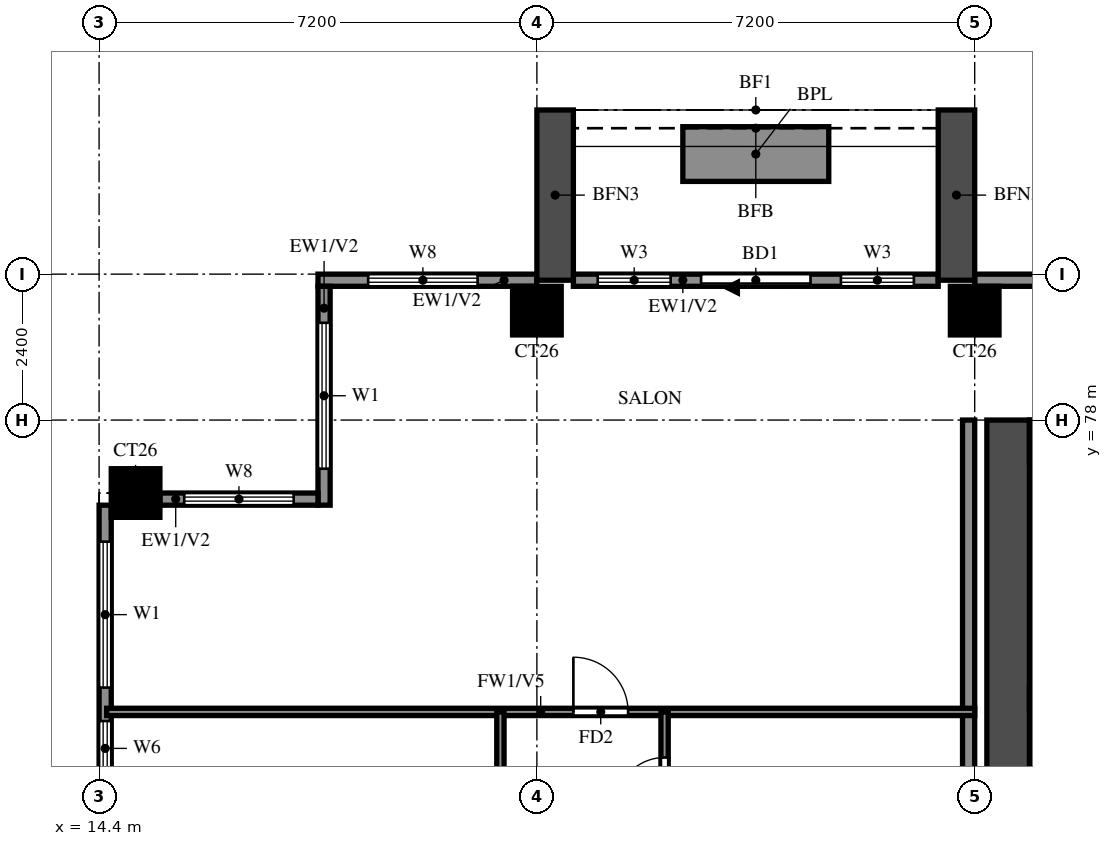
"""IFC4 building model, lengths in metres.
Left out: names, types, materials, properties, quantities, classifications, styles, units other than length and angle.
Written with IfcOpenShell. Run it as: python <this file> out.ifc"""

import sys

from ifc_helpers import new_model, si_unit, direction, frame, frame_2d, origin, origin_2d, place, context, subcontext, project, spatial, rectangle, extrude, source, transform, mapped, element, fill, save


model = new_model("IFC4")
c1 = context("Model", 3, precision=1e-05, world=origin(), true_north=direction((0.0, 1.0)))
c2 = subcontext(c1, "Body", "Model", "MODEL_VIEW")
j1 = project(units=[si_unit("LENGTHUNIT", "METRE"), si_unit("PLANEANGLEUNIT", "RADIAN")], contexts=[c1])
p1 = place(None, origin())
s1 = spatial("IfcSite", under=j1, at=p1, CompositionType="ELEMENT")
p2 = place(p1, origin())
s2 = spatial("IfcBuilding", under=s1, at=p2, CompositionType="ELEMENT")
p3 = place(p2, frame((0.0, 0.0, 178.0)))
s3 = spatial("IfcBuildingStorey", under=s2, at=p3, CompositionType="ELEMENT", Elevation=178.0)
m1 = source(origin(), c2, "Body", "SweptSolid", [
    extrude(rectangle(XDim=0.8, YDim=0.8, at=origin_2d()), origin(), (0.0, 0.0, 1.0), 3.2),
])
for number, where, z_axis, x_axis in (
    (1, (15.0, 76.8, 0.0), (0.0, 0.0, 1.0), (1.0, 0.0, 0.0)),
    (2, (21.6, 79.8, 0.0), (0.0, 0.0, 1.0), (1.0, 0.0, 0.0)),
    (3, (28.8, 79.8, 0.0), (0.0, 0.0, 1.0), (1.0, 0.0, 0.0)),
):
    element("IfcColumn", number, at=place(p3, frame(where, z_axis=z_axis, x_axis=x_axis)), inside=s3, PredefinedType="COLUMN", context=c2, shape_type="MappedRepresentation", body=[
        mapped(m1, transform((0.0, 0.0, 0.0))),
    ])
p4 = place(p3, frame((29.35, 66.1, 0.0), z_axis=(0.0, 0.0, 1.0), x_axis=(0.0, 1.0, 0.0)))
e4 = element("IfcWall", 4, at=p4, inside=s3, PredefinedType="SHEAR", context=c2, shape_type="SweptSolid", body=[
    extrude(rectangle(XDim=11.9, YDim=0.7, at=frame_2d((5.95, 0.0))), origin(), (0.0, 0.0, 1.0), 3.2),
])
p5 = place(p3, frame((29.7, 77.65, 0.0), z_axis=(0.0, 0.0, 1.0), x_axis=(1.0, 0.0, 0.0)))
e5 = element("IfcWall", 5, at=p5, inside=s3, PredefinedType="SHEAR", context=c2, shape_type="SweptSolid", body=[
    extrude(rectangle(XDim=41.4, YDim=0.7, at=frame_2d((20.7, 0.0))), origin(), (0.0, 0.0, 1.0), 3.2),
])
p6 = place(p3, frame((29.7, 73.425, 0.0), z_axis=(0.0, 0.0, 1.0), x_axis=(1.0, 0.0, 0.0)))
e6 = element("IfcWall", 6, at=p6, inside=s3, PredefinedType="SHEAR", context=c2, shape_type="SweptSolid", body=[
    extrude(rectangle(XDim=3.125, YDim=0.35, at=frame_2d((1.562, 0.0))), origin(), (0.0, 0.0, 1.0), 3.2),
])
p7 = place(p3, frame((82.6, 80.3, 0.0), z_axis=(0.0, 0.0, 1.0), x_axis=(-1.0, 0.0, 0.0)))
e7 = element("IfcWall", 7, at=p7, inside=s3, PredefinedType="SOLIDWALL", context=c2, shape_type="SweptSolid", body=[
    extrude(rectangle(XDim=53.8, YDim=0.2, at=frame_2d((26.9, 0.0))), origin(), (0.0, 0.0, 1.0), 3.2),
])
p8 = place(p7, frame((0.725, 0.0, 0.6)))
e8 = element("IfcOpeningElement", 8, at=p8, cuts=e7, PredefinedType="OPENING", context=c2, shape_type="SweptSolid", body=[
    extrude(rectangle(XDim=1.8, YDim=2.4, at=frame_2d((0.9, 1.2))), frame((0.0, 0.11, 0.0), z_axis=(0.0, -1.0, 0.0), x_axis=(1.0, 0.0, 0.0)), (0.0, 0.0, 1.0), 0.22),
])
p9 = place(p7, frame((4.35, 0.0, 0.6)))
e9 = element("IfcOpeningElement", 9, at=p9, cuts=e7, PredefinedType="OPENING", context=c2, shape_type="SweptSolid", body=[
    extrude(rectangle(XDim=2.4, YDim=2.4, at=frame_2d((1.2, 1.2))), frame((0.0, 0.11, 0.0), z_axis=(0.0, -1.0, 0.0), x_axis=(1.0, 0.0, 0.0)), (0.0, 0.0, 1.0), 0.22),
])
p10 = place(p7, frame((7.25, 0.0, 0.6)))
e10 = element("IfcOpeningElement", 10, at=p10, cuts=e7, PredefinedType="OPENING", context=c2, shape_type="SweptSolid", body=[
    extrude(rectangle(XDim=2.4, YDim=2.4, at=frame_2d((1.2, 1.2))), frame((0.0, 0.11, 0.0), z_axis=(0.0, -1.0, 0.0), x_axis=(1.0, 0.0, 0.0)), (0.0, 0.0, 1.0), 0.22),
])
p11 = place(p3, frame((28.2, 80.3, 0.0), z_axis=(0.0, 0.0, 1.0), x_axis=(-1.0, 0.0, 0.0)))
e11 = element("IfcWall", 11, at=p11, inside=s3, PredefinedType="SOLIDWALL", context=c2, shape_type="SweptSolid", body=[
    extrude(rectangle(XDim=6.0, YDim=0.2, at=frame_2d((3.0, 0.0))), origin(), (0.0, 0.0, 1.0), 3.2),
])
p12 = place(p11, frame((2.1, 0.0, 0.0)))
e12 = element("IfcOpeningElement", 12, at=p12, cuts=e11, PredefinedType="OPENING", context=c2, shape_type="SweptSolid", body=[
    extrude(rectangle(XDim=1.8, YDim=2.4, at=frame_2d((0.9, 1.2))), frame((0.0, 0.11, 0.0), z_axis=(0.0, -1.0, 0.0), x_axis=(1.0, 0.0, 0.0)), (0.0, 0.0, 1.0), 0.22),
])
p13 = place(p11, frame((0.4, 0.0, 0.6)))
e13 = element("IfcOpeningElement", 13, at=p13, cuts=e11, PredefinedType="OPENING", context=c2, shape_type="SweptSolid", body=[
    extrude(rectangle(XDim=1.2, YDim=2.4, at=frame_2d((0.6, 1.2))), frame((0.0, 0.11, 0.0), z_axis=(0.0, -1.0, 0.0), x_axis=(1.0, 0.0, 0.0)), (0.0, 0.0, 1.0), 0.22),
])
p14 = place(p11, frame((4.4, 0.0, 0.6)))
e14 = element("IfcOpeningElement", 14, at=p14, cuts=e11, PredefinedType="OPENING", context=c2, shape_type="SweptSolid", body=[
    extrude(rectangle(XDim=1.2, YDim=2.4, at=frame_2d((0.6, 1.2))), frame((0.0, 0.11, 0.0), z_axis=(0.0, -1.0, 0.0), x_axis=(1.0, 0.0, 0.0)), (0.0, 0.0, 1.0), 0.22),
])
p15 = place(p3, frame((21.6, 80.3, 0.0), z_axis=(0.0, 0.0, 1.0), x_axis=(-1.0, 0.0, 0.0)))
e15 = element("IfcWall", 15, at=p15, inside=s3, PredefinedType="SOLIDWALL", context=c2, shape_type="SweptSolid", body=[
    extrude(rectangle(XDim=3.6, YDim=0.2, at=frame_2d((1.8, 0.0))), origin(), (0.0, 0.0, 1.0), 3.2),
])
p16 = place(p15, frame((0.975, 0.0, 0.6)))
e16 = element("IfcOpeningElement", 16, at=p16, cuts=e15, PredefinedType="OPENING", context=c2, shape_type="SweptSolid", body=[
    extrude(rectangle(XDim=1.8, YDim=2.4, at=frame_2d((0.9, 1.2))), frame((0.0, 0.11, 0.0), z_axis=(0.0, -1.0, 0.0), x_axis=(1.0, 0.0, 0.0)), (0.0, 0.0, 1.0), 0.22),
])
p17 = place(p3, frame((18.1, 80.2, 0.0), z_axis=(0.0, 0.0, 1.0), x_axis=(0.0, -1.0, 0.0)))
e17 = element("IfcWall", 17, at=p17, inside=s3, PredefinedType="SOLIDWALL", context=c2, shape_type="SweptSolid", body=[
    extrude(rectangle(XDim=3.6, YDim=0.2, at=frame_2d((1.8, 0.0))), origin(), (0.0, 0.0, 1.0), 3.2),
])
p18 = place(p17, frame((0.6, 0.0, 0.6)))
e18 = element("IfcOpeningElement", 18, at=p18, cuts=e17, PredefinedType="OPENING", context=c2, shape_type="SweptSolid", body=[
    extrude(rectangle(XDim=2.4, YDim=2.4, at=frame_2d((1.2, 1.2))), frame((0.0, 0.11, 0.0), z_axis=(0.0, -1.0, 0.0), x_axis=(1.0, 0.0, 0.0)), (0.0, 0.0, 1.0), 0.22),
])
p19 = place(p3, frame((18.0, 76.7, 0.0), z_axis=(0.0, 0.0, 1.0), x_axis=(-1.0, 0.0, 0.0)))
e19 = element("IfcWall", 19, at=p19, inside=s3, PredefinedType="SOLIDWALL", context=c2, shape_type="SweptSolid", body=[
    extrude(rectangle(XDim=2.6, YDim=0.2, at=frame_2d((1.3, 0.0))), origin(), (0.0, 0.0, 1.0), 3.2),
])
p20 = place(p19, frame((0.4, 0.0, 0.6)))
e20 = element("IfcOpeningElement", 20, at=p20, cuts=e19, PredefinedType="OPENING", context=c2, shape_type="SweptSolid", body=[
    extrude(rectangle(XDim=1.8, YDim=2.4, at=frame_2d((0.9, 1.2))), frame((0.0, 0.11, 0.0), z_axis=(0.0, -1.0, 0.0), x_axis=(1.0, 0.0, 0.0)), (0.0, 0.0, 1.0), 0.22),
])
p21 = place(p3, frame((14.5, 76.6, 0.0), z_axis=(0.0, 0.0, 1.0), x_axis=(0.0, -1.0, 0.0)))
e21 = element("IfcWall", 21, at=p21, inside=s3, PredefinedType="SOLIDWALL", context=c2, shape_type="SweptSolid", body=[
    extrude(rectangle(XDim=33.4, YDim=0.2, at=frame_2d((16.7, 0.0))), origin(), (0.0, 0.0, 1.0), 3.2),
])
p22 = place(p21, frame((7.9, 0.0, 0.0)))
e22 = element("IfcOpeningElement", 22, at=p22, cuts=e21, PredefinedType="OPENING", context=c2, shape_type="SweptSolid", body=[
    extrude(rectangle(XDim=1.8, YDim=2.4, at=frame_2d((0.9, 1.2))), frame((0.0, 0.11, 0.0), z_axis=(0.0, -1.0, 0.0), x_axis=(1.0, 0.0, 0.0)), (0.0, 0.0, 1.0), 0.22),
])
p23 = place(p21, frame((22.3, 0.0, 0.0)))
e23 = element("IfcOpeningElement", 23, at=p23, cuts=e21, PredefinedType="OPENING", context=c2, shape_type="SweptSolid", body=[
    extrude(rectangle(XDim=1.8, YDim=2.4, at=frame_2d((0.9, 1.2))), frame((0.0, 0.11, 0.0), z_axis=(0.0, -1.0, 0.0), x_axis=(1.0, 0.0, 0.0)), (0.0, 0.0, 1.0), 0.22),
])
p24 = place(p21, frame((29.875, 0.0, 0.6)))
e24 = element("IfcOpeningElement", 24, at=p24, cuts=e21, PredefinedType="OPENING", context=c2, shape_type="SweptSolid", body=[
    extrude(rectangle(XDim=2.4, YDim=2.4, at=frame_2d((1.2, 1.2))), frame((0.0, 0.11, 0.0), z_axis=(0.0, -1.0, 0.0), x_axis=(1.0, 0.0, 0.0)), (0.0, 0.0, 1.0), 0.22),
])
p25 = place(p21, frame((26.325, 0.0, 0.6)))
e25 = element("IfcOpeningElement", 25, at=p25, cuts=e21, PredefinedType="OPENING", context=c2, shape_type="SweptSolid", body=[
    extrude(rectangle(XDim=1.8, YDim=2.4, at=frame_2d((0.9, 1.2))), frame((0.0, 0.11, 0.0), z_axis=(0.0, -1.0, 0.0), x_axis=(1.0, 0.0, 0.0)), (0.0, 0.0, 1.0), 0.22),
])
p26 = place(p21, frame((17.95, 0.0, 0.6)))
e26 = element("IfcOpeningElement", 26, at=p26, cuts=e21, PredefinedType="OPENING", context=c2, shape_type="SweptSolid", body=[
    extrude(rectangle(XDim=0.9, YDim=2.4, at=frame_2d((0.45, 1.2))), frame((0.0, 0.11, 0.0), z_axis=(0.0, -1.0, 0.0), x_axis=(1.0, 0.0, 0.0)), (0.0, 0.0, 1.0), 0.22),
])
p27 = place(p21, frame((19.725, 0.0, 0.6)))
e27 = element("IfcOpeningElement", 27, at=p27, cuts=e21, PredefinedType="OPENING", context=c2, shape_type="SweptSolid", body=[
    extrude(rectangle(XDim=1.2, YDim=2.4, at=frame_2d((0.6, 1.2))), frame((0.0, 0.11, 0.0), z_axis=(0.0, -1.0, 0.0), x_axis=(1.0, 0.0, 0.0)), (0.0, 0.0, 1.0), 0.22),
])
p28 = place(p21, frame((14.975, 0.0, 0.6)))
e28 = element("IfcOpeningElement", 28, at=p28, cuts=e21, PredefinedType="OPENING", context=c2, shape_type="SweptSolid", body=[
    extrude(rectangle(XDim=2.4, YDim=2.4, at=frame_2d((1.2, 1.2))), frame((0.0, 0.11, 0.0), z_axis=(0.0, -1.0, 0.0), x_axis=(1.0, 0.0, 0.0)), (0.0, 0.0, 1.0), 0.22),
])
p29 = place(p21, frame((10.15, 0.0, 0.6)))
e29 = element("IfcOpeningElement", 29, at=p29, cuts=e21, PredefinedType="OPENING", context=c2, shape_type="SweptSolid", body=[
    extrude(rectangle(XDim=0.9, YDim=2.4, at=frame_2d((0.45, 1.2))), frame((0.0, 0.11, 0.0), z_axis=(0.0, -1.0, 0.0), x_axis=(1.0, 0.0, 0.0)), (0.0, 0.0, 1.0), 0.22),
])
p30 = place(p21, frame((11.925, 0.0, 0.6)))
e30 = element("IfcOpeningElement", 30, at=p30, cuts=e21, PredefinedType="OPENING", context=c2, shape_type="SweptSolid", body=[
    extrude(rectangle(XDim=1.8, YDim=2.4, at=frame_2d((0.9, 1.2))), frame((0.0, 0.11, 0.0), z_axis=(0.0, -1.0, 0.0), x_axis=(1.0, 0.0, 0.0)), (0.0, 0.0, 1.0), 0.22),
])
p31 = place(p21, frame((3.55, 0.0, 1.5)))
e31 = element("IfcOpeningElement", 31, at=p31, cuts=e21, PredefinedType="OPENING", context=c2, shape_type="SweptSolid", body=[
    extrude(rectangle(XDim=0.9, YDim=0.9, at=frame_2d((0.45, 0.45))), frame((0.0, 0.11, 0.0), z_axis=(0.0, -1.0, 0.0), x_axis=(1.0, 0.0, 0.0)), (0.0, 0.0, 1.0), 0.22),
])
p32 = place(p21, frame((5.475, 0.0, 1.5)))
e32 = element("IfcOpeningElement", 32, at=p32, cuts=e21, PredefinedType="OPENING", context=c2, shape_type="SweptSolid", body=[
    extrude(rectangle(XDim=0.9, YDim=0.9, at=frame_2d((0.45, 0.45))), frame((0.0, 0.11, 0.0), z_axis=(0.0, -1.0, 0.0), x_axis=(1.0, 0.0, 0.0)), (0.0, 0.0, 1.0), 0.22),
])
p33 = place(p21, frame((0.6, 0.0, 0.6)))
e33 = element("IfcOpeningElement", 33, at=p33, cuts=e21, PredefinedType="OPENING", context=c2, shape_type="SweptSolid", body=[
    extrude(rectangle(XDim=2.4, YDim=2.4, at=frame_2d((1.2, 1.2))), frame((0.0, 0.11, 0.0), z_axis=(0.0, -1.0, 0.0), x_axis=(1.0, 0.0, 0.0)), (0.0, 0.0, 1.0), 0.22),
])
for number, where, z_axis, x_axis in (
    (34, (28.5, 80.3, 0.0), (0.0, 0.0, 1.0), (0.0, 1.0, 0.0)),
    (35, (21.9, 80.3, 0.0), (0.0, 0.0, 1.0), (0.0, 1.0, 0.0)),
):
    element("IfcWall", number, at=place(p3, frame(where, z_axis=z_axis, x_axis=x_axis)), inside=s3, PredefinedType="SOLIDWALL", context=c2, shape_type="SweptSolid", body=[
        extrude(rectangle(XDim=2.8, YDim=0.6, at=frame_2d((1.4, 0.0))), origin(), (0.0, 0.0, 1.0), 2.85),
    ])
p34 = place(p3, frame((26.4, 82.375, 0.0), z_axis=(0.0, 0.0, 1.0), x_axis=(-1.0, 0.0, 0.0)))
e36 = element("IfcWall", 36, at=p34, inside=s3, PredefinedType="SOLIDWALL", context=c2, shape_type="SweptSolid", body=[
    extrude(rectangle(XDim=2.4, YDim=0.9, at=frame_2d((1.2, 0.0))), origin(), (0.0, 0.0, 1.0), 0.9),
])
p35 = place(p3, frame((28.7, 62.4, 0.0), z_axis=(0.0, 0.0, 1.0), x_axis=(0.0, 1.0, 0.0)))
e37 = element("IfcWall", 37, at=p35, inside=s3, PredefinedType="SOLIDWALL", context=c2, shape_type="SweptSolid", body=[
    extrude(rectangle(XDim=15.6, YDim=0.2, at=frame_2d((7.8, 0.0))), origin(), (0.0, 0.0, 1.0), 3.2),
])
p36 = place(p3, frame((14.525, 73.2, 0.0), z_axis=(0.0, 0.0, 1.0), x_axis=(1.0, 0.0, 0.0)))
e38 = element("IfcWall", 38, at=p36, inside=s3, PredefinedType="PARTITIONING", context=c2, shape_type="SweptSolid", body=[
    extrude(rectangle(XDim=14.275, YDim=0.12, at=frame_2d((7.138, 0.0))), origin(), (0.0, 0.0, 1.0), 2.3),
])
p37 = place(p36, frame((7.675, 0.0, 0.0)))
e39 = element("IfcOpeningElement", 39, at=p37, cuts=e38, PredefinedType="OPENING", context=c2, shape_type="SweptSolid", body=[
    extrude(rectangle(XDim=0.9, YDim=2.1, at=frame_2d((0.45, 1.05))), frame((0.0, 0.07, 0.0), z_axis=(0.0, -1.0, 0.0), x_axis=(1.0, 0.0, 0.0)), (0.0, 0.0, 1.0), 0.14),
])
p38 = place(p3, frame((21.0, 69.6, 0.0), z_axis=(0.0, 0.0, 1.0), x_axis=(0.0, 1.0, 0.0)))
e40 = element("IfcWall", 40, at=p38, inside=s3, PredefinedType="PARTITIONING", context=c2, shape_type="SweptSolid", body=[
    extrude(rectangle(XDim=3.6, YDim=0.12, at=frame_2d((1.8, 0.0))), origin(), (0.0, 0.0, 1.0), 3.2),
])
p39 = place(p3, frame((23.7, 61.2, 0.0), z_axis=(0.0, 0.0, 1.0), x_axis=(0.0, 1.0, 0.0)))
e41 = element("IfcWall", 41, at=p39, inside=s3, PredefinedType="PARTITIONING", context=c2, shape_type="SweptSolid", body=[
    extrude(rectangle(XDim=12.0, YDim=0.12, at=frame_2d((6.0, 0.0))), origin(), (0.0, 0.0, 1.0), 3.2),
])
p40 = place(p39, frame((4.2, 0.0, 0.0)))
e42 = element("IfcOpeningElement", 42, at=p40, cuts=e41, PredefinedType="OPENING", context=c2, shape_type="SweptSolid", body=[
    extrude(rectangle(XDim=0.9, YDim=2.1, at=frame_2d((0.45, 1.05))), frame((0.0, 0.07, 0.0), z_axis=(0.0, -1.0, 0.0), x_axis=(1.0, 0.0, 0.0)), (0.0, 0.0, 1.0), 0.14),
])
p41 = place(p39, frame((7.975, 0.0, 0.0)))
e43 = element("IfcOpeningElement", 43, at=p41, cuts=e41, PredefinedType="OPENING", context=c2, shape_type="SweptSolid", body=[
    extrude(rectangle(XDim=0.8, YDim=2.1, at=frame_2d((0.4, 1.05))), frame((0.0, 0.07, 0.0), z_axis=(0.0, -1.0, 0.0), x_axis=(1.0, 0.0, 0.0)), (0.0, 0.0, 1.0), 0.14),
])
p42 = place(p39, frame((10.45, 0.0, 0.0)))
e44 = element("IfcOpeningElement", 44, at=p42, cuts=e41, PredefinedType="OPENING", context=c2, shape_type="SweptSolid", body=[
    extrude(rectangle(XDim=0.8, YDim=2.1, at=frame_2d((0.4, 1.05))), frame((0.0, 0.07, 0.0), z_axis=(0.0, -1.0, 0.0), x_axis=(1.0, 0.0, 0.0)), (0.0, 0.0, 1.0), 0.14),
])
p43 = place(p12, origin())
e45 = element("IfcDoor", 45, at=p43, inside=s3, OperationType="DOUBLE_DOOR_SLIDING", PredefinedType="DOOR", context=c2, shape_type="SweptSolid", body=[
    extrude(rectangle(XDim=1.8, YDim=2.4, at=frame_2d((0.9, 1.2))), frame((0.0, 0.025, 0.0), z_axis=(0.0, -1.0, 0.0), x_axis=(1.0, 0.0, 0.0)), (0.0, 0.0, 1.0), 0.05),
])
fill(e12, e45)
p44 = place(p13, origin())
e46 = element("IfcWindow", 46, at=p44, inside=s3, PartitioningType="SINGLE_PANEL", PredefinedType="WINDOW", context=c2, shape_type="SweptSolid", body=[
    extrude(rectangle(XDim=1.2, YDim=2.4, at=frame_2d((0.6, 1.2))), frame((0.0, 0.03, 0.0), z_axis=(0.0, -1.0, 0.0), x_axis=(1.0, 0.0, 0.0)), (0.0, 0.0, 1.0), 0.06),
])
fill(e13, e46)
p45 = place(p14, origin())
e47 = element("IfcWindow", 47, at=p45, inside=s3, PartitioningType="SINGLE_PANEL", PredefinedType="WINDOW", context=c2, shape_type="SweptSolid", body=[
    extrude(rectangle(XDim=1.2, YDim=2.4, at=frame_2d((0.6, 1.2))), frame((0.0, 0.03, 0.0), z_axis=(0.0, -1.0, 0.0), x_axis=(1.0, 0.0, 0.0)), (0.0, 0.0, 1.0), 0.06),
])
fill(e14, e47)
p46 = place(p16, origin())
e48 = element("IfcWindow", 48, at=p46, inside=s3, PartitioningType="DOUBLE_PANEL_VERTICAL", PredefinedType="WINDOW", context=c2, shape_type="SweptSolid", body=[
    extrude(rectangle(XDim=1.8, YDim=2.4, at=frame_2d((0.9, 1.2))), frame((0.0, 0.03, 0.0), z_axis=(0.0, -1.0, 0.0), x_axis=(1.0, 0.0, 0.0)), (0.0, 0.0, 1.0), 0.06),
])
fill(e16, e48)
p47 = place(p18, origin())
e49 = element("IfcWindow", 49, at=p47, inside=s3, PartitioningType="DOUBLE_PANEL_VERTICAL", PredefinedType="WINDOW", context=c2, shape_type="SweptSolid", body=[
    extrude(rectangle(XDim=2.4, YDim=2.4, at=frame_2d((1.2, 1.2))), frame((0.0, 0.03, 0.0), z_axis=(0.0, -1.0, 0.0), x_axis=(1.0, 0.0, 0.0)), (0.0, 0.0, 1.0), 0.06),
])
fill(e18, e49)
p48 = place(p20, origin())
e50 = element("IfcWindow", 50, at=p48, inside=s3, PartitioningType="DOUBLE_PANEL_VERTICAL", PredefinedType="WINDOW", context=c2, shape_type="SweptSolid", body=[
    extrude(rectangle(XDim=1.8, YDim=2.4, at=frame_2d((0.9, 1.2))), frame((0.0, 0.03, 0.0), z_axis=(0.0, -1.0, 0.0), x_axis=(1.0, 0.0, 0.0)), (0.0, 0.0, 1.0), 0.06),
])
fill(e20, e50)
p49 = place(p31, origin())
e51 = element("IfcWindow", 51, at=p49, inside=s3, PartitioningType="SINGLE_PANEL", PredefinedType="WINDOW", context=c2, shape_type="SweptSolid", body=[
    extrude(rectangle(XDim=0.9, YDim=0.9, at=frame_2d((0.45, 0.45))), frame((0.0, 0.03, 0.0), z_axis=(0.0, -1.0, 0.0), x_axis=(1.0, 0.0, 0.0)), (0.0, 0.0, 1.0), 0.06),
])
fill(e31, e51)
p50 = place(p33, origin())
e52 = element("IfcWindow", 52, at=p50, inside=s3, PartitioningType="DOUBLE_PANEL_VERTICAL", PredefinedType="WINDOW", context=c2, shape_type="SweptSolid", body=[
    extrude(rectangle(XDim=2.4, YDim=2.4, at=frame_2d((1.2, 1.2))), frame((0.0, 0.03, 0.0), z_axis=(0.0, -1.0, 0.0), x_axis=(1.0, 0.0, 0.0)), (0.0, 0.0, 1.0), 0.06),
])
fill(e33, e52)
p51 = place(p37, origin())
e53 = element("IfcDoor", 53, at=p51, inside=s3, OperationType="SINGLE_SWING_LEFT", PredefinedType="DOOR", context=c2, shape_type="SweptSolid", body=[
    extrude(rectangle(XDim=0.9, YDim=2.1, at=frame_2d((0.45, 1.05))), frame((0.0, 0.025, 0.0), z_axis=(0.0, -1.0, 0.0), x_axis=(1.0, 0.0, 0.0)), (0.0, 0.0, 1.0), 0.05),
])
fill(e39, e53)
p52 = place(p42, origin())
e54 = element("IfcDoor", 54, at=p52, inside=s3, OperationType="SINGLE_SWING_RIGHT", PredefinedType="DOOR", context=c2, shape_type="SweptSolid", body=[
    extrude(rectangle(XDim=0.8, YDim=2.1, at=frame_2d((0.4, 1.05))), frame((0.0, 0.025, 0.0), z_axis=(0.0, -1.0, 0.0), x_axis=(1.0, 0.0, 0.0)), (0.0, 0.0, 1.0), 0.05),
])
fill(e44, e54)
save(model, sys.argv[1])
